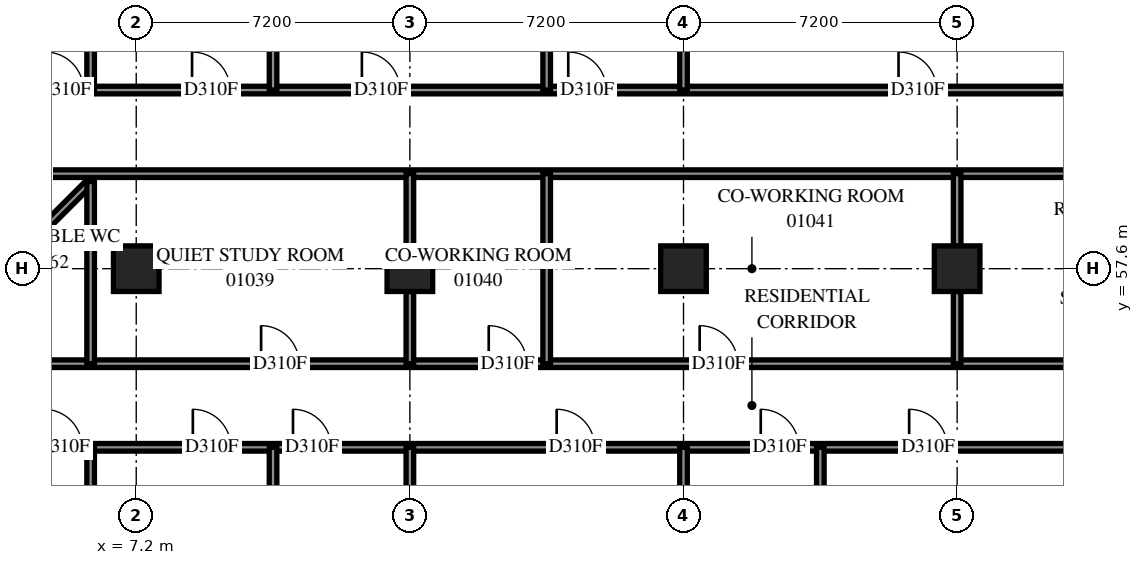
"""IFC4 building model, lengths in metres.
Left out: names, types, materials, properties, quantities, classifications, styles, units other than length and angle.
Written with IfcOpenShell. Run it as: python <this file> out.ifc"""

import sys

from ifc_helpers import new_model, si_unit, direction, frame, frame_2d, origin, origin_2d, place, context, subcontext, project, spatial, rectangle, extrude, element, fill, save


model = new_model("IFC4")
c1 = context("Model", 3, precision=1e-05, world=origin(), true_north=direction((0.0, 1.0)))
c2 = subcontext(c1, "Body", "Model", "MODEL_VIEW")
j1 = project(units=[si_unit("LENGTHUNIT", "METRE"), si_unit("PLANEANGLEUNIT", "RADIAN")], contexts=[c1])
p1 = place(None, origin())
s1 = spatial("IfcSite", under=j1, at=p1, CompositionType="ELEMENT")
p2 = place(p1, origin())
s2 = spatial("IfcBuilding", under=s1, at=p2, CompositionType="ELEMENT")
p3 = place(p2, frame((0.0, 0.0, 6.0)))
s3 = spatial("IfcBuildingStorey", under=s2, at=p3, CompositionType="ELEMENT", Elevation=6.0)
for number, where, z_axis, x_axis in (
    (1, (7.2, 57.6, 0.0), (0.0, 0.0, 1.0), (1.0, 0.0, 0.0)),
    (2, (14.4, 57.6, 0.0), (0.0, 0.0, 1.0), (1.0, 0.0, 0.0)),
    (3, (21.6, 57.6, 0.0), (0.0, 0.0, 1.0), (1.0, 0.0, 0.0)),
    (4, (28.8, 57.6, 0.0), (0.0, 0.0, 1.0), (1.0, 0.0, 0.0)),
):
    element("IfcColumn", number, at=place(p3, frame(where, z_axis=z_axis, x_axis=x_axis)), inside=s3, PredefinedType="COLUMN", context=c2, shape_type="SweptSolid", body=[
        extrude(rectangle(XDim=1.2, YDim=1.2, at=origin_2d()), origin(), (0.0, 0.0, 1.0), 3.8),
    ])
p4 = place(p3, frame((0.0, 55.1, 0.0), z_axis=(0.0, 0.0, 1.0), x_axis=(1.0, 0.0, 0.0)))
e5 = element("IfcWall", 5, at=p4, inside=s3, PredefinedType="PARTITIONING", context=c2, shape_type="SweptSolid", body=[
    extrude(rectangle(XDim=54.4, YDim=0.2, at=frame_2d((27.2, 0.0))), origin(), (0.0, 0.0, 1.0), 3.8),
])
p5 = place(p4, frame((10.485, 0.0, 0.0)))
e6 = element("IfcOpeningElement", 6, at=p5, cuts=e5, PredefinedType="OPENING", context=c2, shape_type="SweptSolid", body=[
    extrude(rectangle(XDim=1.0, YDim=2.1, at=frame_2d((0.5, 1.05))), frame((0.0, 0.11, 0.0), z_axis=(0.0, -1.0, 0.0), x_axis=(1.0, 0.0, 0.0)), (0.0, 0.0, 1.0), 0.22),
])
p6 = place(p4, frame((16.475, 0.0, 0.0)))
e7 = element("IfcOpeningElement", 7, at=p6, cuts=e5, PredefinedType="OPENING", context=c2, shape_type="SweptSolid", body=[
    extrude(rectangle(XDim=1.0, YDim=2.1, at=frame_2d((0.5, 1.05))), frame((0.0, 0.11, 0.0), z_axis=(0.0, -1.0, 0.0), x_axis=(1.0, 0.0, 0.0)), (0.0, 0.0, 1.0), 0.22),
])
p7 = place(p4, frame((22.025, 0.0, 0.0)))
e8 = element("IfcOpeningElement", 8, at=p7, cuts=e5, PredefinedType="OPENING", context=c2, shape_type="SweptSolid", body=[
    extrude(rectangle(XDim=1.0, YDim=2.1, at=frame_2d((0.5, 1.05))), frame((0.0, 0.11, 0.0), z_axis=(0.0, -1.0, 0.0), x_axis=(1.0, 0.0, 0.0)), (0.0, 0.0, 1.0), 0.22),
])
p8 = place(p4, frame((34.484, 0.0, 0.0)))
e9 = element("IfcOpeningElement", 9, at=p8, cuts=e5, PredefinedType="OPENING", context=c2, shape_type="SweptSolid", body=[
    extrude(rectangle(XDim=1.0, YDim=2.1, at=frame_2d((0.5, 1.05))), frame((0.0, 0.11, 0.0), z_axis=(0.0, -1.0, 0.0), x_axis=(1.0, 0.0, 0.0)), (0.0, 0.0, 1.0), 0.22),
])
p9 = place(p4, frame((40.125, 0.0, 0.0)))
e10 = element("IfcOpeningElement", 10, at=p9, cuts=e5, PredefinedType="OPENING", context=c2, shape_type="SweptSolid", body=[
    extrude(rectangle(XDim=1.0, YDim=2.1, at=frame_2d((0.5, 1.05))), frame((0.0, 0.11, 0.0), z_axis=(0.0, -1.0, 0.0), x_axis=(1.0, 0.0, 0.0)), (0.0, 0.0, 1.0), 0.22),
])
p10 = place(p4, frame((47.086, 0.0, 0.0)))
e11 = element("IfcOpeningElement", 11, at=p10, cuts=e5, PredefinedType="OPENING", context=c2, shape_type="SweptSolid", body=[
    extrude(rectangle(XDim=1.0, YDim=2.1, at=frame_2d((0.5, 1.05))), frame((0.0, 0.11, 0.0), z_axis=(0.0, -1.0, 0.0), x_axis=(1.0, 0.0, 0.0)), (0.0, 0.0, 1.0), 0.22),
])
p11 = place(p4, frame((52.709, 0.0, 0.0)))
e12 = element("IfcOpeningElement", 12, at=p11, cuts=e5, PredefinedType="OPENING", context=c2, shape_type="SweptSolid", body=[
    extrude(rectangle(XDim=1.0, YDim=2.1, at=frame_2d((0.5, 1.05))), frame((0.0, 0.11, 0.0), z_axis=(0.0, -1.0, 0.0), x_axis=(1.0, 0.0, 0.0)), (0.0, 0.0, 1.0), 0.22),
])
p12 = place(p4, frame((2.451, 0.0, 0.0)))
e13 = element("IfcOpeningElement", 13, at=p12, cuts=e5, PredefinedType="OPENING", context=c2, shape_type="SweptSolid", body=[
    extrude(rectangle(XDim=1.0, YDim=2.1, at=frame_2d((0.5, 1.05))), frame((0.0, 0.11, 0.0), z_axis=(0.0, -1.0, 0.0), x_axis=(1.0, 0.0, 0.0)), (0.0, 0.0, 1.0), 0.22),
])
p13 = place(p3, frame((0.0, 52.9, 0.0), z_axis=(0.0, 0.0, 1.0), x_axis=(1.0, 0.0, 0.0)))
e14 = element("IfcWall", 14, at=p13, inside=s3, PredefinedType="PARTITIONING", context=c2, shape_type="SweptSolid", body=[
    extrude(rectangle(XDim=54.4, YDim=0.2, at=frame_2d((27.2, 0.0))), origin(), (0.0, 0.0, 1.0), 3.8),
])
p14 = place(p13, frame((8.689, 0.0, 0.0)))
e15 = element("IfcOpeningElement", 15, at=p14, cuts=e14, PredefinedType="OPENING", context=c2, shape_type="SweptSolid", body=[
    extrude(rectangle(XDim=1.0, YDim=2.1, at=frame_2d((0.5, 1.05))), frame((0.0, 0.11, 0.0), z_axis=(0.0, -1.0, 0.0), x_axis=(1.0, 0.0, 0.0)), (0.0, 0.0, 1.0), 0.22),
])
p15 = place(p13, frame((11.325, 0.0, 0.0)))
e16 = element("IfcOpeningElement", 16, at=p15, cuts=e14, PredefinedType="OPENING", context=c2, shape_type="SweptSolid", body=[
    extrude(rectangle(XDim=1.0, YDim=2.1, at=frame_2d((0.5, 1.05))), frame((0.0, 0.11, 0.0), z_axis=(0.0, -1.0, 0.0), x_axis=(1.0, 0.0, 0.0)), (0.0, 0.0, 1.0), 0.22),
])
p16 = place(p13, frame((18.262, 0.0, 0.0)))
e17 = element("IfcOpeningElement", 17, at=p16, cuts=e14, PredefinedType="OPENING", context=c2, shape_type="SweptSolid", body=[
    extrude(rectangle(XDim=1.0, YDim=2.1, at=frame_2d((0.5, 1.05))), frame((0.0, 0.11, 0.0), z_axis=(0.0, -1.0, 0.0), x_axis=(1.0, 0.0, 0.0)), (0.0, 0.0, 1.0), 0.22),
])
p17 = place(p13, frame((23.633, 0.0, 0.0)))
e18 = element("IfcOpeningElement", 18, at=p17, cuts=e14, PredefinedType="OPENING", context=c2, shape_type="SweptSolid", body=[
    extrude(rectangle(XDim=1.0, YDim=2.1, at=frame_2d((0.5, 1.05))), frame((0.0, 0.11, 0.0), z_axis=(0.0, -1.0, 0.0), x_axis=(1.0, 0.0, 0.0)), (0.0, 0.0, 1.0), 0.22),
])
p18 = place(p13, frame((27.538, 0.0, 0.0)))
e19 = element("IfcOpeningElement", 19, at=p18, cuts=e14, PredefinedType="OPENING", context=c2, shape_type="SweptSolid", body=[
    extrude(rectangle(XDim=1.0, YDim=2.1, at=frame_2d((0.5, 1.05))), frame((0.0, 0.11, 0.0), z_axis=(0.0, -1.0, 0.0), x_axis=(1.0, 0.0, 0.0)), (0.0, 0.0, 1.0), 0.22),
])
p19 = place(p13, frame((32.907, 0.0, 0.0)))
e20 = element("IfcOpeningElement", 20, at=p19, cuts=e14, PredefinedType="OPENING", context=c2, shape_type="SweptSolid", body=[
    extrude(rectangle(XDim=1.0, YDim=2.1, at=frame_2d((0.5, 1.05))), frame((0.0, 0.11, 0.0), z_axis=(0.0, -1.0, 0.0), x_axis=(1.0, 0.0, 0.0)), (0.0, 0.0, 1.0), 0.22),
])
p20 = place(p13, frame((38.032, 0.0, 0.0)))
e21 = element("IfcOpeningElement", 21, at=p20, cuts=e14, PredefinedType="OPENING", context=c2, shape_type="SweptSolid", body=[
    extrude(rectangle(XDim=1.0, YDim=2.1, at=frame_2d((0.5, 1.05))), frame((0.0, 0.11, 0.0), z_axis=(0.0, -1.0, 0.0), x_axis=(1.0, 0.0, 0.0)), (0.0, 0.0, 1.0), 0.22),
])
p21 = place(p13, frame((41.938, 0.0, 0.0)))
e22 = element("IfcOpeningElement", 22, at=p21, cuts=e14, PredefinedType="OPENING", context=c2, shape_type="SweptSolid", body=[
    extrude(rectangle(XDim=1.0, YDim=2.1, at=frame_2d((0.5, 1.05))), frame((0.0, 0.11, 0.0), z_axis=(0.0, -1.0, 0.0), x_axis=(1.0, 0.0, 0.0)), (0.0, 0.0, 1.0), 0.22),
])
p22 = place(p13, frame((47.307, 0.0, 0.0)))
e23 = element("IfcOpeningElement", 23, at=p22, cuts=e14, PredefinedType="OPENING", context=c2, shape_type="SweptSolid", body=[
    extrude(rectangle(XDim=1.0, YDim=2.1, at=frame_2d((0.5, 1.05))), frame((0.0, 0.11, 0.0), z_axis=(0.0, -1.0, 0.0), x_axis=(1.0, 0.0, 0.0)), (0.0, 0.0, 1.0), 0.22),
])
p23 = place(p13, frame((52.432, 0.0, 0.0)))
e24 = element("IfcOpeningElement", 24, at=p23, cuts=e14, PredefinedType="OPENING", context=c2, shape_type="SweptSolid", body=[
    extrude(rectangle(XDim=1.0, YDim=2.1, at=frame_2d((0.5, 1.05))), frame((0.0, 0.11, 0.0), z_axis=(0.0, -1.0, 0.0), x_axis=(1.0, 0.0, 0.0)), (0.0, 0.0, 1.0), 0.22),
])
p24 = place(p13, frame((2.288, 0.0, 0.0)))
e25 = element("IfcOpeningElement", 25, at=p24, cuts=e14, PredefinedType="OPENING", context=c2, shape_type="SweptSolid", body=[
    extrude(rectangle(XDim=1.0, YDim=2.1, at=frame_2d((0.5, 1.05))), frame((0.0, 0.11, 0.0), z_axis=(0.0, -1.0, 0.0), x_axis=(1.0, 0.0, 0.0)), (0.0, 0.0, 1.0), 0.22),
])
p25 = place(p13, frame((4.772, 0.0, 0.0)))
e26 = element("IfcOpeningElement", 26, at=p25, cuts=e14, PredefinedType="OPENING", context=c2, shape_type="SweptSolid", body=[
    extrude(rectangle(XDim=1.0, YDim=2.1, at=frame_2d((0.5, 1.05))), frame((0.0, 0.11, 0.0), z_axis=(0.0, -1.0, 0.0), x_axis=(1.0, 0.0, 0.0)), (0.0, 0.0, 1.0), 0.22),
])
p26 = place(p3, frame((0.002, 60.1, 0.0), z_axis=(0.0, 0.0, 1.0), x_axis=(1.0, 0.0, 0.0)))
e27 = element("IfcWall", 27, at=p26, inside=s3, PredefinedType="PARTITIONING", context=c2, shape_type="SweptSolid", body=[
    extrude(rectangle(XDim=54.398, YDim=0.2, at=frame_2d((27.199, 0.0))), origin(), (0.0, 0.0, 1.0), 3.8),
])
p27 = place(p26, frame((3.729, 0.0, 0.0)))
e28 = element("IfcOpeningElement", 28, at=p27, cuts=e27, PredefinedType="OPENING", context=c2, shape_type="SweptSolid", body=[
    extrude(rectangle(XDim=1.0, YDim=2.1, at=frame_2d((0.5, 1.05))), frame((0.0, 0.11, 0.0), z_axis=(0.0, -1.0, 0.0), x_axis=(1.0, 0.0, 0.0)), (0.0, 0.0, 1.0), 0.22),
])
p28 = place(p3, frame((0.002, 62.3, 0.0), z_axis=(0.0, 0.0, 1.0), x_axis=(1.0, 0.0, 0.0)))
e29 = element("IfcWall", 29, at=p28, inside=s3, PredefinedType="PARTITIONING", context=c2, shape_type="SweptSolid", body=[
    extrude(rectangle(XDim=54.398, YDim=0.2, at=frame_2d((27.199, 0.0))), origin(), (0.0, 0.0, 1.0), 3.8),
])
p29 = place(p28, frame((8.667, 0.0, 0.0)))
e30 = element("IfcOpeningElement", 30, at=p29, cuts=e29, PredefinedType="OPENING", context=c2, shape_type="SweptSolid", body=[
    extrude(rectangle(XDim=1.0, YDim=2.1, at=frame_2d((0.5, 1.05))), frame((0.0, 0.11, 0.0), z_axis=(0.0, -1.0, 0.0), x_axis=(1.0, 0.0, 0.0)), (0.0, 0.0, 1.0), 0.22),
])
p30 = place(p28, frame((13.136, 0.0, 0.0)))
e31 = element("IfcOpeningElement", 31, at=p30, cuts=e29, PredefinedType="OPENING", context=c2, shape_type="SweptSolid", body=[
    extrude(rectangle(XDim=1.0, YDim=2.1, at=frame_2d((0.5, 1.05))), frame((0.0, 0.11, 0.0), z_axis=(0.0, -1.0, 0.0), x_axis=(1.0, 0.0, 0.0)), (0.0, 0.0, 1.0), 0.22),
])
p31 = place(p28, frame((18.566, 0.0, 0.0)))
e32 = element("IfcOpeningElement", 32, at=p31, cuts=e29, PredefinedType="OPENING", context=c2, shape_type="SweptSolid", body=[
    extrude(rectangle(XDim=1.0, YDim=2.1, at=frame_2d((0.5, 1.05))), frame((0.0, 0.11, 0.0), z_axis=(0.0, -1.0, 0.0), x_axis=(1.0, 0.0, 0.0)), (0.0, 0.0, 1.0), 0.22),
])
p32 = place(p28, frame((27.256, 0.0, 0.0)))
e33 = element("IfcOpeningElement", 33, at=p32, cuts=e29, PredefinedType="OPENING", context=c2, shape_type="SweptSolid", body=[
    extrude(rectangle(XDim=1.0, YDim=2.1, at=frame_2d((0.5, 1.05))), frame((0.0, 0.11, 0.0), z_axis=(0.0, -1.0, 0.0), x_axis=(1.0, 0.0, 0.0)), (0.0, 0.0, 1.0), 0.22),
])
p33 = place(p28, frame((34.736, 0.0, 0.0)))
e34 = element("IfcOpeningElement", 34, at=p33, cuts=e29, PredefinedType="OPENING", context=c2, shape_type="SweptSolid", body=[
    extrude(rectangle(XDim=1.0, YDim=2.1, at=frame_2d((0.5, 1.05))), frame((0.0, 0.11, 0.0), z_axis=(0.0, -1.0, 0.0), x_axis=(1.0, 0.0, 0.0)), (0.0, 0.0, 1.0), 0.22),
])
p34 = place(p28, frame((40.166, 0.0, 0.0)))
e35 = element("IfcOpeningElement", 35, at=p34, cuts=e29, PredefinedType="OPENING", context=c2, shape_type="SweptSolid", body=[
    extrude(rectangle(XDim=1.0, YDim=2.1, at=frame_2d((0.5, 1.05))), frame((0.0, 0.11, 0.0), z_axis=(0.0, -1.0, 0.0), x_axis=(1.0, 0.0, 0.0)), (0.0, 0.0, 1.0), 0.22),
])
p35 = place(p28, frame((45.291, 0.0, 0.0)))
e36 = element("IfcOpeningElement", 36, at=p35, cuts=e29, PredefinedType="OPENING", context=c2, shape_type="SweptSolid", body=[
    extrude(rectangle(XDim=1.0, YDim=2.1, at=frame_2d((0.5, 1.05))), frame((0.0, 0.11, 0.0), z_axis=(0.0, -1.0, 0.0), x_axis=(1.0, 0.0, 0.0)), (0.0, 0.0, 1.0), 0.22),
])
p36 = place(p28, frame((49.136, 0.0, 0.0)))
e37 = element("IfcOpeningElement", 37, at=p36, cuts=e29, PredefinedType="OPENING", context=c2, shape_type="SweptSolid", body=[
    extrude(rectangle(XDim=1.0, YDim=2.1, at=frame_2d((0.5, 1.05))), frame((0.0, 0.11, 0.0), z_axis=(0.0, -1.0, 0.0), x_axis=(1.0, 0.0, 0.0)), (0.0, 0.0, 1.0), 0.22),
])
p37 = place(p28, frame((4.807, 0.0, 0.0)))
e38 = element("IfcOpeningElement", 38, at=p37, cuts=e29, PredefinedType="OPENING", context=c2, shape_type="SweptSolid", body=[
    extrude(rectangle(XDim=1.0, YDim=2.1, at=frame_2d((0.5, 1.05))), frame((0.0, 0.11, 0.0), z_axis=(0.0, -1.0, 0.0), x_axis=(1.0, 0.0, 0.0)), (0.0, 0.0, 1.0), 0.22),
])
p38 = place(p3, frame((25.2, 42.0, 0.0), z_axis=(0.0, 0.0, 1.0), x_axis=(0.0, 1.0, 0.0)))
e39 = element("IfcWall", 39, at=p38, inside=s3, PredefinedType="PARTITIONING", context=c2, shape_type="SweptSolid", body=[
    extrude(rectangle(XDim=10.9, YDim=0.2, at=frame_2d((5.45, 0.0))), origin(), (0.0, 0.0, 1.0), 3.8),
])
for number, where, z_axis, x_axis in (
    (40, (6.0, 42.13, 0.0), (0.0, 0.0, 1.0), (0.0, 1.0, 0.0)),
    (41, (10.8, 42.13, 0.0), (0.0, 0.0, 1.0), (0.0, 1.0, 0.0)),
):
    element("IfcWall", number, at=place(p3, frame(where, z_axis=z_axis, x_axis=x_axis)), inside=s3, PredefinedType="PARTITIONING", context=c2, shape_type="SweptSolid", body=[
        extrude(rectangle(XDim=10.77, YDim=0.2, at=frame_2d((5.385, 0.0))), origin(), (0.0, 0.0, 1.0), 3.8),
    ])
for number, where, z_axis, x_axis in (
    (42, (10.8, 62.3, 0.0), (0.0, 0.0, 1.0), (0.0, 1.0, 0.0)),
    (43, (18.0, 62.3, 0.0), (0.0, 0.0, 1.0), (0.0, 1.0, 0.0)),
):
    element("IfcWall", number, at=place(p3, frame(where, z_axis=z_axis, x_axis=x_axis)), inside=s3, PredefinedType="PARTITIONING", context=c2, shape_type="SweptSolid", body=[
        extrude(rectangle(XDim=10.7, YDim=0.2, at=frame_2d((5.35, 0.0))), origin(), (0.0, 0.0, 1.0), 3.8),
    ])
p39 = place(p3, frame((6.0, 62.3, 0.0), z_axis=(0.0, 0.0, 1.0), x_axis=(0.0, 1.0, 0.0)))
e44 = element("IfcWall", 44, at=p39, inside=s3, PredefinedType="PARTITIONING", context=c2, shape_type="SweptSolid", body=[
    extrude(rectangle(XDim=10.698, YDim=0.2, at=frame_2d((5.349, 0.0))), origin(), (0.0, 0.0, 1.0), 3.8),
])
p40 = place(p3, frame((1.205, 55.101, 0.0), z_axis=(0.0, 0.0, 1.0), x_axis=(0.7071067812, 0.7071067812, 0.0)))
e45 = element("IfcWall", 45, at=p40, inside=s3, PredefinedType="PARTITIONING", context=c2, shape_type="SweptSolid", body=[
    extrude(rectangle(XDim=6.78, YDim=0.2, at=frame_2d((3.39, 0.0))), origin(), (0.0, 0.0, 1.0), 3.8),
])
p41 = place(p3, frame((18.0, 55.1, 0.0), z_axis=(0.0, 0.0, 1.0), x_axis=(0.0, 1.0, 0.0)))
e46 = element("IfcWall", 46, at=p41, inside=s3, PredefinedType="PARTITIONING", context=c2, shape_type="SweptSolid", body=[
    extrude(rectangle(XDim=5.0, YDim=0.2, at=frame_2d((2.5, 0.0))), origin(), (0.0, 0.0, 1.0), 3.8),
])
p42 = place(p3, frame((6.0, 55.1, 0.0), z_axis=(0.0, 0.0, 1.0), x_axis=(0.0, 1.0, 0.0)))
e47 = element("IfcWall", 47, at=p42, inside=s3, PredefinedType="PARTITIONING", context=c2, shape_type="SweptSolid", body=[
    extrude(rectangle(XDim=4.794, YDim=0.2, at=frame_2d((2.397, 0.0))), origin(), (0.0, 0.0, 1.0), 3.8),
])
for number, where, z_axis, x_axis in (
    (48, (21.6, 62.3, 0.0), (0.0, 0.0, 1.0), (0.0, 1.0, 0.0)),
    (49, (14.4, 51.0, 0.0), (0.0, 0.0, 1.0), (0.0, 1.0, 0.0)),
    (50, (14.4, 55.1, 0.0), (0.0, 0.0, 1.0), (0.0, 1.0, 0.0)),
    (51, (14.4, 58.2, 0.0), (0.0, 0.0, 1.0), (0.0, 1.0, 0.0)),
    (52, (21.6, 51.0, 0.0), (0.0, 0.0, 1.0), (0.0, 1.0, 0.0)),
    (53, (28.8, 55.1, 0.0), (0.0, 0.0, 1.0), (0.0, 1.0, 0.0)),
    (54, (28.8, 58.2, 0.0), (0.0, 0.0, 1.0), (0.0, 1.0, 0.0)),
):
    element("IfcWall", number, at=place(p3, frame(where, z_axis=z_axis, x_axis=x_axis)), inside=s3, PredefinedType="PARTITIONING", context=c2, shape_type="SweptSolid", body=[
        extrude(rectangle(XDim=1.9, YDim=0.2, at=frame_2d((0.95, 0.0))), origin(), (0.0, 0.0, 1.0), 3.8),
    ])
p43 = place(p14, origin())
e55 = element("IfcDoor", 55, at=p43, inside=s3, OperationType="SINGLE_SWING_LEFT", PredefinedType="DOOR", context=c2, shape_type="SweptSolid", body=[
    extrude(rectangle(XDim=1.0, YDim=2.1, at=frame_2d((0.5, 1.05))), frame((0.0, 0.025, 0.0), z_axis=(0.0, -1.0, 0.0), x_axis=(1.0, 0.0, 0.0)), (0.0, 0.0, 1.0), 0.05),
])
fill(e15, e55)
p44 = place(p15, origin())
e56 = element("IfcDoor", 56, at=p44, inside=s3, OperationType="SINGLE_SWING_RIGHT", PredefinedType="DOOR", context=c2, shape_type="SweptSolid", body=[
    extrude(rectangle(XDim=1.0, YDim=2.1, at=frame_2d((0.5, 1.05))), frame((0.0, 0.025, 0.0), z_axis=(0.0, -1.0, 0.0), x_axis=(1.0, 0.0, 0.0)), (0.0, 0.0, 1.0), 0.05),
])
fill(e16, e56)
p45 = place(p16, origin())
e57 = element("IfcDoor", 57, at=p45, inside=s3, OperationType="SINGLE_SWING_LEFT", PredefinedType="DOOR", context=c2, shape_type="SweptSolid", body=[
    extrude(rectangle(XDim=1.0, YDim=2.1, at=frame_2d((0.5, 1.05))), frame((0.0, 0.025, 0.0), z_axis=(0.0, -1.0, 0.0), x_axis=(1.0, 0.0, 0.0)), (0.0, 0.0, 1.0), 0.05),
])
fill(e17, e57)
p46 = place(p17, origin())
e58 = element("IfcDoor", 58, at=p46, inside=s3, OperationType="SINGLE_SWING_LEFT", PredefinedType="DOOR", context=c2, shape_type="SweptSolid", body=[
    extrude(rectangle(XDim=1.0, YDim=2.1, at=frame_2d((0.5, 1.05))), frame((0.0, 0.025, 0.0), z_axis=(0.0, -1.0, 0.0), x_axis=(1.0, 0.0, 0.0)), (0.0, 0.0, 1.0), 0.05),
])
fill(e18, e58)
p47 = place(p18, origin())
e59 = element("IfcDoor", 59, at=p47, inside=s3, OperationType="SINGLE_SWING_RIGHT", PredefinedType="DOOR", context=c2, shape_type="SweptSolid", body=[
    extrude(rectangle(XDim=1.0, YDim=2.1, at=frame_2d((0.5, 1.05))), frame((0.0, 0.025, 0.0), z_axis=(0.0, -1.0, 0.0), x_axis=(1.0, 0.0, 0.0)), (0.0, 0.0, 1.0), 0.05),
])
fill(e19, e59)
p48 = place(p5, origin())
e60 = element("IfcDoor", 60, at=p48, inside=s3, OperationType="SINGLE_SWING_RIGHT", PredefinedType="DOOR", context=c2, shape_type="SweptSolid", body=[
    extrude(rectangle(XDim=1.0, YDim=2.1, at=frame_2d((0.5, 1.05))), frame((0.0, 0.025, 0.0), z_axis=(0.0, -1.0, 0.0), x_axis=(1.0, 0.0, 0.0)), (0.0, 0.0, 1.0), 0.05),
])
fill(e6, e60)
p49 = place(p6, origin())
e61 = element("IfcDoor", 61, at=p49, inside=s3, OperationType="SINGLE_SWING_RIGHT", PredefinedType="DOOR", context=c2, shape_type="SweptSolid", body=[
    extrude(rectangle(XDim=1.0, YDim=2.1, at=frame_2d((0.5, 1.05))), frame((0.0, 0.025, 0.0), z_axis=(0.0, -1.0, 0.0), x_axis=(1.0, 0.0, 0.0)), (0.0, 0.0, 1.0), 0.05),
])
fill(e7, e61)
p50 = place(p7, origin())
e62 = element("IfcDoor", 62, at=p50, inside=s3, OperationType="SINGLE_SWING_LEFT", PredefinedType="DOOR", context=c2, shape_type="SweptSolid", body=[
    extrude(rectangle(XDim=1.0, YDim=2.1, at=frame_2d((0.5, 1.05))), frame((0.0, 0.025, 0.0), z_axis=(0.0, -1.0, 0.0), x_axis=(1.0, 0.0, 0.0)), (0.0, 0.0, 1.0), 0.05),
])
fill(e8, e62)
p51 = place(p29, origin())
e63 = element("IfcDoor", 63, at=p51, inside=s3, OperationType="SINGLE_SWING_RIGHT", PredefinedType="DOOR", context=c2, shape_type="SweptSolid", body=[
    extrude(rectangle(XDim=1.0, YDim=2.1, at=frame_2d((0.5, 1.05))), frame((0.0, 0.025, 0.0), z_axis=(0.0, -1.0, 0.0), x_axis=(1.0, 0.0, 0.0)), (0.0, 0.0, 1.0), 0.05),
])
fill(e30, e63)
p52 = place(p30, origin())
e64 = element("IfcDoor", 64, at=p52, inside=s3, OperationType="SINGLE_SWING_LEFT", PredefinedType="DOOR", context=c2, shape_type="SweptSolid", body=[
    extrude(rectangle(XDim=1.0, YDim=2.1, at=frame_2d((0.5, 1.05))), frame((0.0, 0.025, 0.0), z_axis=(0.0, -1.0, 0.0), x_axis=(1.0, 0.0, 0.0)), (0.0, 0.0, 1.0), 0.05),
])
fill(e31, e64)
p53 = place(p31, origin())
e65 = element("IfcDoor", 65, at=p53, inside=s3, OperationType="SINGLE_SWING_LEFT", PredefinedType="DOOR", context=c2, shape_type="SweptSolid", body=[
    extrude(rectangle(XDim=1.0, YDim=2.1, at=frame_2d((0.5, 1.05))), frame((0.0, 0.025, 0.0), z_axis=(0.0, -1.0, 0.0), x_axis=(1.0, 0.0, 0.0)), (0.0, 0.0, 1.0), 0.05),
])
fill(e32, e65)
p54 = place(p32, origin())
e66 = element("IfcDoor", 66, at=p54, inside=s3, OperationType="SINGLE_SWING_RIGHT", PredefinedType="DOOR", context=c2, shape_type="SweptSolid", body=[
    extrude(rectangle(XDim=1.0, YDim=2.1, at=frame_2d((0.5, 1.05))), frame((0.0, 0.025, 0.0), z_axis=(0.0, -1.0, 0.0), x_axis=(1.0, 0.0, 0.0)), (0.0, 0.0, 1.0), 0.05),
])
fill(e33, e66)
p55 = place(p37, origin())
e67 = element("IfcDoor", 67, at=p55, inside=s3, OperationType="SINGLE_SWING_LEFT", PredefinedType="DOOR", context=c2, shape_type="SweptSolid", body=[
    extrude(rectangle(XDim=1.0, YDim=2.1, at=frame_2d((0.5, 1.05))), frame((0.0, 0.025, 0.0), z_axis=(0.0, -1.0, 0.0), x_axis=(1.0, 0.0, 0.0)), (0.0, 0.0, 1.0), 0.05),
])
fill(e38, e67)
p56 = place(p25, origin())
e68 = element("IfcDoor", 68, at=p56, inside=s3, OperationType="SINGLE_SWING_LEFT", PredefinedType="DOOR", context=c2, shape_type="SweptSolid", body=[
    extrude(rectangle(XDim=1.0, YDim=2.1, at=frame_2d((0.5, 1.05))), frame((0.0, 0.025, 0.0), z_axis=(0.0, -1.0, 0.0), x_axis=(1.0, 0.0, 0.0)), (0.0, 0.0, 1.0), 0.05),
])
fill(e26, e68)
save(model, sys.argv[1])
